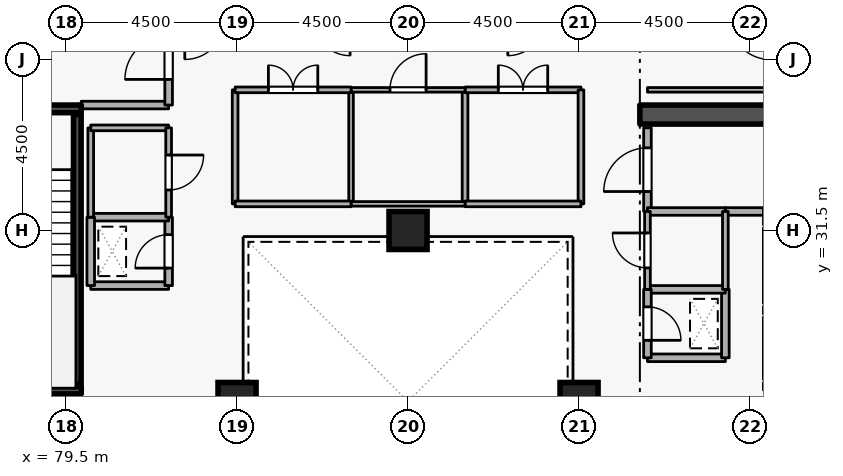
"""IFC4 building model, lengths in metres.
Left out: names, types, materials, properties, quantities, classifications, styles, units other than length and angle.
Written with IfcOpenShell. Run it as: python <this file> out.ifc"""

import sys

from ifc_helpers import new_model, si_unit, direction, frame, frame_2d, origin, origin_2d, place, context, subcontext, project, spatial, rectangle, extrude, element, fill, save


model = new_model("IFC4")
c1 = context("Model", 3, precision=1e-05, world=origin(), true_north=direction((0.0, 1.0)))
c2 = subcontext(c1, "Body", "Model", "MODEL_VIEW")
j1 = project(units=[si_unit("LENGTHUNIT", "METRE"), si_unit("PLANEANGLEUNIT", "RADIAN")], contexts=[c1])
p1 = place(None, origin())
s1 = spatial("IfcSite", under=j1, at=p1, CompositionType="ELEMENT")
p2 = place(p1, origin())
s2 = spatial("IfcBuilding", under=s1, at=p2, CompositionType="ELEMENT")
p3 = place(p2, frame((0.0, 0.0, 218.1)))
s3 = spatial("IfcBuildingStorey", under=s2, at=p3, CompositionType="ELEMENT", Elevation=218.1)
p4 = place(p3, frame((94.6, 34.55, 0.0), z_axis=(0.0, 0.0, 1.0), x_axis=(1.0, 0.0, 0.0)))
e1 = element("IfcWall", 1, at=p4, inside=s3, PredefinedType="SHEAR", context=c2, shape_type="SweptSolid", body=[
    extrude(rectangle(XDim=5.8, YDim=0.5, at=frame_2d((2.9, 0.0))), origin(), (0.0, 0.0, 1.0), 3.6),
])
for number, where, z_axis, x_axis in (
    (2, (93.0, 27.0, 0.0), (0.0, 0.0, 1.0), (1.0, 0.0, 0.0)),
    (3, (84.0, 27.0, 0.0), (0.0, 0.0, 1.0), (1.0, 0.0, 0.0)),
    (4, (88.5, 31.5, 0.0), (0.0, 0.0, 1.0), (1.0, 0.0, 0.0)),
):
    element("IfcColumn", number, at=place(p3, frame(where, z_axis=z_axis, x_axis=x_axis)), inside=s3, PredefinedType="COLUMN", context=c2, shape_type="SweptSolid", body=[
        extrude(rectangle(XDim=1.0, YDim=1.0, at=origin_2d()), origin(), (0.0, 0.0, 1.0), 3.6),
    ])
p5 = place(p3, frame((97.95, 29.22, 0.0), z_axis=(0.0, 0.0, 1.0), x_axis=(0.0, -1.0, 0.0)))
e5 = element("IfcWall", 5, at=p5, inside=s3, PredefinedType="STANDARD", context=c2, shape_type="SweptSolid", body=[
    extrude(rectangle(XDim=1.64, YDim=0.2, at=frame_2d((0.82, 0.0))), origin(), (0.0, 0.0, 1.0), 3.26),
])
p6 = place(p5, frame((0.31, 0.0, 0.0)))
e6 = element("IfcOpeningElement", 6, at=p6, cuts=e5, PredefinedType="OPENING", context=c2, shape_type="SweptSolid", body=[
    extrude(rectangle(XDim=1.02, YDim=2.06, at=frame_2d((0.51, 1.03))), frame((0.0, 0.11, 0.0), z_axis=(0.0, -1.0, 0.0), x_axis=(1.0, 0.0, 0.0)), (0.0, 0.0, 1.0), 0.22),
])
p7 = place(p3, frame((97.95, 31.57, 0.0), z_axis=(0.0, 0.0, 1.0), x_axis=(0.0, -1.0, 0.0)))
e7 = element("IfcWall", 7, at=p7, inside=s3, PredefinedType="STANDARD", context=c2, shape_type="SweptSolid", body=[
    extrude(rectangle(XDim=1.99, YDim=0.2, at=frame_2d((0.995, 0.0))), origin(), (0.0, 0.0, 1.0), 3.26),
])
p8 = place(p7, frame((0.485, 0.0, 0.0)))
e8 = element("IfcOpeningElement", 8, at=p8, cuts=e7, PredefinedType="OPENING", context=c2, shape_type="SweptSolid", body=[
    extrude(rectangle(XDim=1.02, YDim=2.06, at=frame_2d((0.51, 1.03))), frame((0.0, 0.11, 0.0), z_axis=(0.0, -1.0, 0.0), x_axis=(1.0, 0.0, 0.0)), (0.0, 0.0, 1.0), 0.22),
])
p9 = place(p3, frame((76.55, 34.7, 0.0), z_axis=(0.0, 0.0, 1.0), x_axis=(1.0, 0.0, 0.0)))
e9 = element("IfcWall", 9, at=p9, inside=s3, PredefinedType="SHEAR", context=c2, shape_type="SweptSolid", body=[
    extrude(rectangle(XDim=3.35, YDim=0.2, at=frame_2d((1.675, 0.0))), origin(), (0.0, 0.0, 1.0), 3.6),
])
p10 = place(p9, frame((1.125, 0.0, 0.0)))
e10 = element("IfcOpeningElement", 10, at=p10, cuts=e9, PredefinedType="OPENING", context=c2, shape_type="SweptSolid", body=[
    extrude(rectangle(XDim=1.1, YDim=2.1, at=frame_2d((0.55, 1.05))), frame((0.0, 0.11, 0.0), z_axis=(0.0, -1.0, 0.0), x_axis=(1.0, 0.0, 0.0)), (0.0, 0.0, 1.0), 0.22),
])
p11 = place(p3, frame((79.9, 27.3, 0.0), z_axis=(0.0, 0.0, 1.0), x_axis=(-1.0, 0.0, 0.0)))
e11 = element("IfcWall", 11, at=p11, inside=s3, PredefinedType="SHEAR", context=c2, shape_type="SweptSolid", body=[
    extrude(rectangle(XDim=3.35, YDim=0.2, at=frame_2d((1.675, 0.0))), origin(), (0.0, 0.0, 1.0), 3.6),
])
p12 = place(p3, frame((79.797, 27.45, 0.0), z_axis=(0.0, 0.0, 1.0), x_axis=(0.0, 1.0, 0.0)))
e12 = element("IfcWall", 12, at=p12, inside=s3, PredefinedType="SHEAR", context=c2, shape_type="SweptSolid", body=[
    extrude(rectangle(XDim=7.1, YDim=0.2, at=frame_2d((3.55, 0.0))), origin(), (0.0, 0.0, 1.0), 3.6),
])
p13 = place(p3, frame((79.9, 34.8, 0.0), z_axis=(0.0, 0.0, 1.0), x_axis=(1.0, 0.0, 0.0)))
e13 = element("IfcWall", 13, at=p13, inside=s3, PredefinedType="STANDARD", context=c2, shape_type="SweptSolid", body=[
    extrude(rectangle(XDim=2.3, YDim=0.2, at=frame_2d((1.15, 0.0))), origin(), (0.0, 0.0, 1.0), 2.465),
])
p14 = place(p3, frame((82.2, 34.8, 0.0), z_axis=(0.0, 0.0, 1.0), x_axis=(0.0, 1.0, 0.0)))
e14 = element("IfcWall", 14, at=p14, inside=s3, PredefinedType="STANDARD", context=c2, shape_type="SweptSolid", body=[
    extrude(rectangle(XDim=2.5, YDim=0.2, at=frame_2d((1.25, 0.0))), origin(), (0.0, 0.0, 1.0), 3.26),
])
p15 = place(p14, frame((0.675, 0.0, 0.0)))
e15 = element("IfcOpeningElement", 15, at=p15, cuts=e14, PredefinedType="OPENING", context=c2, shape_type="SweptSolid", body=[
    extrude(rectangle(XDim=1.15, YDim=2.1, at=frame_2d((0.575, 1.05))), frame((0.0, 0.11, 0.0), z_axis=(0.0, -1.0, 0.0), x_axis=(1.0, 0.0, 0.0)), (0.0, 0.0, 1.0), 0.22),
])
p16 = place(p3, frame((94.8, 28.15, 0.0), z_axis=(0.0, 0.0, 1.0), x_axis=(1.0, 0.0, 0.0)))
e16 = element("IfcWall", 16, at=p16, inside=s3, PredefinedType="STANDARD", context=c2, shape_type="SweptSolid", body=[
    extrude(rectangle(XDim=2.05, YDim=0.2, at=frame_2d((1.025, 0.0))), origin(), (0.0, 0.0, 1.0), 3.26),
])
p17 = place(p3, frame((96.85, 28.15, 0.0), z_axis=(0.0, 0.0, 1.0), x_axis=(0.0, 1.0, 0.0)))
e17 = element("IfcWall", 17, at=p17, inside=s3, PredefinedType="STANDARD", context=c2, shape_type="SweptSolid", body=[
    extrude(rectangle(XDim=1.8, YDim=0.2, at=frame_2d((0.9, 0.0))), origin(), (0.0, 0.0, 1.0), 3.26),
])
p18 = place(p3, frame((96.85, 29.95, 0.0), z_axis=(0.0, 0.0, 1.0), x_axis=(-1.0, 0.0, 0.0)))
e18 = element("IfcWall", 18, at=p18, inside=s3, PredefinedType="STANDARD", context=c2, shape_type="SweptSolid", body=[
    extrude(rectangle(XDim=2.05, YDim=0.2, at=frame_2d((1.025, 0.0))), origin(), (0.0, 0.0, 1.0), 3.26),
])
p19 = place(p3, frame((94.8, 29.95, 0.0), z_axis=(0.0, 0.0, 1.0), x_axis=(0.0, -1.0, 0.0)))
e19 = element("IfcWall", 19, at=p19, inside=s3, PredefinedType="STANDARD", context=c2, shape_type="SweptSolid", body=[
    extrude(rectangle(XDim=1.8, YDim=0.2, at=frame_2d((0.9, 0.0))), origin(), (0.0, 0.0, 1.0), 3.26),
])
p20 = place(p19, frame((0.46, 0.0, 0.0)))
e20 = element("IfcOpeningElement", 20, at=p20, cuts=e19, PredefinedType="OPENING", context=c2, shape_type="SweptSolid", body=[
    extrude(rectangle(XDim=0.88, YDim=2.04, at=frame_2d((0.44, 1.02))), frame((0.0, 0.11, 0.0), z_axis=(0.0, -1.0, 0.0), x_axis=(1.0, 0.0, 0.0)), (0.0, 0.0, 1.0), 0.22),
])
p21 = place(p3, frame((80.15, 30.05, 0.0), z_axis=(0.0, 0.0, 1.0), x_axis=(1.0, 0.0, 0.0)))
e21 = element("IfcWall", 21, at=p21, inside=s3, PredefinedType="STANDARD", context=c2, shape_type="SweptSolid", body=[
    extrude(rectangle(XDim=2.05, YDim=0.2, at=frame_2d((1.025, 0.0))), origin(), (0.0, 0.0, 1.0), 3.26),
])
p22 = place(p3, frame((82.2, 30.05, 0.0), z_axis=(0.0, 0.0, 1.0), x_axis=(0.0, 1.0, 0.0)))
e22 = element("IfcWall", 22, at=p22, inside=s3, PredefinedType="STANDARD", context=c2, shape_type="SweptSolid", body=[
    extrude(rectangle(XDim=1.8, YDim=0.2, at=frame_2d((0.9, 0.0))), origin(), (0.0, 0.0, 1.0), 3.26),
])
p23 = place(p22, frame((0.46, 0.0, 0.0)))
e23 = element("IfcOpeningElement", 23, at=p23, cuts=e22, PredefinedType="OPENING", context=c2, shape_type="SweptSolid", body=[
    extrude(rectangle(XDim=0.88, YDim=2.04, at=frame_2d((0.44, 1.02))), frame((0.0, 0.11, 0.0), z_axis=(0.0, -1.0, 0.0), x_axis=(1.0, 0.0, 0.0)), (0.0, 0.0, 1.0), 0.22),
])
p24 = place(p3, frame((82.2, 31.85, 0.0), z_axis=(0.0, 0.0, 1.0), x_axis=(-1.0, 0.0, 0.0)))
e24 = element("IfcWall", 24, at=p24, inside=s3, PredefinedType="STANDARD", context=c2, shape_type="SweptSolid", body=[
    extrude(rectangle(XDim=2.05, YDim=0.2, at=frame_2d((1.025, 0.0))), origin(), (0.0, 0.0, 1.0), 3.26),
])
p25 = place(p3, frame((80.15, 31.85, 0.0), z_axis=(0.0, 0.0, 1.0), x_axis=(0.0, -1.0, 0.0)))
e25 = element("IfcWall", 25, at=p25, inside=s3, PredefinedType="STANDARD", context=c2, shape_type="SweptSolid", body=[
    extrude(rectangle(XDim=1.8, YDim=0.2, at=frame_2d((0.9, 0.0))), origin(), (0.0, 0.0, 1.0), 3.26),
])
p26 = place(p3, frame((94.8, 32.0, 0.0), z_axis=(0.0, 0.0, 1.0), x_axis=(0.0, 1.0, 0.0)))
e26 = element("IfcWall", 26, at=p26, inside=s3, PredefinedType="STANDARD", context=c2, shape_type="SweptSolid", body=[
    extrude(rectangle(XDim=2.2, YDim=0.2, at=frame_2d((1.1, 0.0))), origin(), (0.0, 0.0, 1.0), 3.26),
])
p27 = place(p26, frame((0.525, 0.0, 0.0)))
e27 = element("IfcOpeningElement", 27, at=p27, cuts=e26, PredefinedType="OPENING", context=c2, shape_type="SweptSolid", body=[
    extrude(rectangle(XDim=1.15, YDim=2.1, at=frame_2d((0.575, 1.05))), frame((0.0, 0.11, 0.0), z_axis=(0.0, -1.0, 0.0), x_axis=(1.0, 0.0, 0.0)), (0.0, 0.0, 1.0), 0.22),
])
p28 = place(p3, frame((97.852, 32.0, 0.0), z_axis=(0.0, 0.0, 1.0), x_axis=(-1.0, 0.0, 0.0)))
e28 = element("IfcWall", 28, at=p28, inside=s3, PredefinedType="STANDARD", context=c2, shape_type="SweptSolid", body=[
    extrude(rectangle(XDim=1.002, YDim=0.2, at=frame_2d((0.501, 0.0))), origin(), (0.0, 0.0, 1.0), 3.26),
])
p29 = place(p3, frame((96.85, 32.0, 0.0), z_axis=(0.0, 0.0, 1.0), x_axis=(-1.0, 0.0, 0.0)))
e29 = element("IfcWall", 29, at=p29, inside=s3, PredefinedType="STANDARD", context=c2, shape_type="SweptSolid", body=[
    extrude(rectangle(XDim=2.05, YDim=0.2, at=frame_2d((1.025, 0.0))), origin(), (0.0, 0.0, 1.0), 3.26),
])
p30 = place(p3, frame((94.8, 29.95, 0.0), z_axis=(0.0, 0.0, 1.0), x_axis=(0.0, 1.0, 0.0)))
e30 = element("IfcWall", 30, at=p30, inside=s3, PredefinedType="PARTITIONING", context=c2, shape_type="SweptSolid", body=[
    extrude(rectangle(XDim=2.05, YDim=0.15, at=frame_2d((1.025, 0.0))), origin(), (0.0, 0.0, 1.0), 3.26),
])
p31 = place(p30, frame((0.565, 0.0, 0.0)))
e31 = element("IfcOpeningElement", 31, at=p31, cuts=e30, PredefinedType="OPENING", context=c2, shape_type="SweptSolid", body=[
    extrude(rectangle(XDim=0.92, YDim=2.08, at=frame_2d((0.46, 1.04))), frame((0.0, 0.085, 0.0), z_axis=(0.0, -1.0, 0.0), x_axis=(1.0, 0.0, 0.0)), (0.0, 0.0, 1.0), 0.17),
])
p32 = place(p3, frame((96.85, 32.0, 0.0), z_axis=(0.0, 0.0, 1.0), x_axis=(0.0, -1.0, 0.0)))
e32 = element("IfcWall", 32, at=p32, inside=s3, PredefinedType="PARTITIONING", context=c2, shape_type="SweptSolid", body=[
    extrude(rectangle(XDim=2.05, YDim=0.15, at=frame_2d((1.025, 0.0))), origin(), (0.0, 0.0, 1.0), 3.26),
])
p33 = place(p3, frame((80.15, 31.85, 0.0), z_axis=(0.0, 0.0, 1.0), x_axis=(0.0, 1.0, 0.0)))
e33 = element("IfcWall", 33, at=p33, inside=s3, PredefinedType="PARTITIONING", context=c2, shape_type="SweptSolid", body=[
    extrude(rectangle(XDim=2.35, YDim=0.15, at=frame_2d((1.175, 0.0))), origin(), (0.0, 0.0, 1.0), 3.26),
])
p34 = place(p3, frame((80.15, 34.2, 0.0), z_axis=(0.0, 0.0, 1.0), x_axis=(1.0, 0.0, 0.0)))
e34 = element("IfcWall", 34, at=p34, inside=s3, PredefinedType="PARTITIONING", context=c2, shape_type="SweptSolid", body=[
    extrude(rectangle(XDim=2.05, YDim=0.15, at=frame_2d((1.025, 0.0))), origin(), (0.0, 0.0, 1.0), 2.465),
])
p35 = place(p3, frame((82.2, 34.2, 0.0), z_axis=(0.0, 0.0, 1.0), x_axis=(0.0, -1.0, 0.0)))
e35 = element("IfcWall", 35, at=p35, inside=s3, PredefinedType="PARTITIONING", context=c2, shape_type="SweptSolid", body=[
    extrude(rectangle(XDim=2.35, YDim=0.15, at=frame_2d((1.175, 0.0))), origin(), (0.0, 0.0, 1.0), 3.26),
])
p36 = place(p35, frame((0.715, 0.0, 0.0)))
e36 = element("IfcOpeningElement", 36, at=p36, cuts=e35, PredefinedType="OPENING", context=c2, shape_type="SweptSolid", body=[
    extrude(rectangle(XDim=0.92, YDim=2.08, at=frame_2d((0.46, 1.04))), frame((0.0, 0.085, 0.0), z_axis=(0.0, -1.0, 0.0), x_axis=(1.0, 0.0, 0.0)), (0.0, 0.0, 1.0), 0.17),
])
p37 = place(p3, frame((94.8, 35.2, 0.0), z_axis=(0.0, 0.0, 1.0), x_axis=(1.0, 0.0, 0.0)))
e37 = element("IfcWall", 37, at=p37, inside=s3, PredefinedType="PARTITIONING", context=c2, shape_type="SweptSolid", body=[
    extrude(rectangle(XDim=5.9, YDim=0.12, at=frame_2d((2.95, 0.0))), origin(), (0.0, 0.0, 1.0), 3.26),
])
p38 = place(p3, frame((90.0, 32.2, 0.0), z_axis=(0.0, 0.0, 1.0), x_axis=(0.0, 1.0, 0.0)))
e38 = element("IfcWall", 38, at=p38, inside=s3, PredefinedType="PARTITIONING", context=c2, shape_type="SweptSolid", body=[
    extrude(rectangle(XDim=3.0, YDim=0.15, at=frame_2d((1.5, 0.0))), origin(), (0.0, 0.0, 1.0), 3.26),
])
p39 = place(p3, frame((90.0, 35.2, 0.0), z_axis=(0.0, 0.0, 1.0), x_axis=(1.0, 0.0, 0.0)))
e39 = element("IfcWall", 39, at=p39, inside=s3, PredefinedType="PARTITIONING", context=c2, shape_type="SweptSolid", body=[
    extrude(rectangle(XDim=3.05, YDim=0.15, at=frame_2d((1.525, 0.0))), origin(), (0.0, 0.0, 1.0), 3.26),
])
p40 = place(p39, frame((0.875, 0.0, 0.0)))
e40 = element("IfcOpeningElement", 40, at=p40, cuts=e39, PredefinedType="OPENING", context=c2, shape_type="SweptSolid", body=[
    extrude(rectangle(XDim=1.3, YDim=2.12, at=frame_2d((0.65, 1.06))), frame((0.0, 0.085, 0.0), z_axis=(0.0, -1.0, 0.0), x_axis=(1.0, 0.0, 0.0)), (0.0, 0.0, 1.0), 0.17),
])
p41 = place(p3, frame((93.05, 35.2, 0.0), z_axis=(0.0, 0.0, 1.0), x_axis=(0.0, -1.0, 0.0)))
e41 = element("IfcWall", 41, at=p41, inside=s3, PredefinedType="PARTITIONING", context=c2, shape_type="SweptSolid", body=[
    extrude(rectangle(XDim=3.0, YDim=0.15, at=frame_2d((1.5, 0.0))), origin(), (0.0, 0.0, 1.0), 3.26),
])
p42 = place(p3, frame((93.05, 32.2, 0.0), z_axis=(0.0, 0.0, 1.0), x_axis=(-1.0, 0.0, 0.0)))
e42 = element("IfcWall", 42, at=p42, inside=s3, PredefinedType="PARTITIONING", context=c2, shape_type="SweptSolid", body=[
    extrude(rectangle(XDim=3.05, YDim=0.15, at=frame_2d((1.525, 0.0))), origin(), (0.0, 0.0, 1.0), 3.26),
])
p43 = place(p3, frame((87.0, 32.2, 0.0), z_axis=(0.0, 0.0, 1.0), x_axis=(0.0, 1.0, 0.0)))
e43 = element("IfcWall", 43, at=p43, inside=s3, PredefinedType="PARTITIONING", context=c2, shape_type="SweptSolid", body=[
    extrude(rectangle(XDim=3.0, YDim=0.12, at=frame_2d((1.5, 0.0))), origin(), (0.0, 0.0, 1.0), 3.26),
])
p44 = place(p3, frame((87.0, 35.2, 0.0), z_axis=(0.0, 0.0, 1.0), x_axis=(1.0, 0.0, 0.0)))
e44 = element("IfcWall", 44, at=p44, inside=s3, PredefinedType="PARTITIONING", context=c2, shape_type="SweptSolid", body=[
    extrude(rectangle(XDim=3.0, YDim=0.12, at=frame_2d((1.5, 0.0))), origin(), (0.0, 0.0, 1.0), 3.26),
])
p45 = place(p44, frame((1.025, 0.0, 0.0)))
e45 = element("IfcOpeningElement", 45, at=p45, cuts=e44, PredefinedType="OPENING", context=c2, shape_type="SweptSolid", body=[
    extrude(rectangle(XDim=0.95, YDim=2.1, at=frame_2d((0.475, 1.05))), frame((0.0, 0.07, 0.0), z_axis=(0.0, -1.0, 0.0), x_axis=(1.0, 0.0, 0.0)), (0.0, 0.0, 1.0), 0.14),
])
p46 = place(p3, frame((90.0, 32.2, 0.0), z_axis=(0.0, 0.0, 1.0), x_axis=(-1.0, 0.0, 0.0)))
e46 = element("IfcWall", 46, at=p46, inside=s3, PredefinedType="PARTITIONING", context=c2, shape_type="SweptSolid", body=[
    extrude(rectangle(XDim=3.0, YDim=0.12, at=frame_2d((1.5, 0.0))), origin(), (0.0, 0.0, 1.0), 3.26),
])
p47 = place(p3, frame((83.95, 32.2, 0.0), z_axis=(0.0, 0.0, 1.0), x_axis=(0.0, 1.0, 0.0)))
e47 = element("IfcWall", 47, at=p47, inside=s3, PredefinedType="PARTITIONING", context=c2, shape_type="SweptSolid", body=[
    extrude(rectangle(XDim=3.0, YDim=0.15, at=frame_2d((1.5, 0.0))), origin(), (0.0, 0.0, 1.0), 3.26),
])
p48 = place(p3, frame((83.95, 35.2, 0.0), z_axis=(0.0, 0.0, 1.0), x_axis=(1.0, 0.0, 0.0)))
e48 = element("IfcWall", 48, at=p48, inside=s3, PredefinedType="PARTITIONING", context=c2, shape_type="SweptSolid", body=[
    extrude(rectangle(XDim=3.05, YDim=0.15, at=frame_2d((1.525, 0.0))), origin(), (0.0, 0.0, 1.0), 3.26),
])
p49 = place(p48, frame((0.875, 0.0, 0.0)))
e49 = element("IfcOpeningElement", 49, at=p49, cuts=e48, PredefinedType="OPENING", context=c2, shape_type="SweptSolid", body=[
    extrude(rectangle(XDim=1.3, YDim=2.12, at=frame_2d((0.65, 1.06))), frame((0.0, 0.085, 0.0), z_axis=(0.0, -1.0, 0.0), x_axis=(1.0, 0.0, 0.0)), (0.0, 0.0, 1.0), 0.17),
])
p50 = place(p3, frame((87.0, 32.2, 0.0), z_axis=(0.0, 0.0, 1.0), x_axis=(-1.0, 0.0, 0.0)))
e50 = element("IfcWall", 50, at=p50, inside=s3, PredefinedType="PARTITIONING", context=c2, shape_type="SweptSolid", body=[
    extrude(rectangle(XDim=3.05, YDim=0.15, at=frame_2d((1.525, 0.0))), origin(), (0.0, 0.0, 1.0), 3.26),
])
p51 = place(p15, origin())
e51 = element("IfcDoor", 51, at=p51, inside=s3, OperationType="SINGLE_SWING_LEFT", PredefinedType="DOOR", context=c2, shape_type="SweptSolid", body=[
    extrude(rectangle(XDim=1.15, YDim=2.1, at=frame_2d((0.575, 1.05))), frame((0.0, 0.025, 0.0), z_axis=(0.0, -1.0, 0.0), x_axis=(1.0, 0.0, 0.0)), (0.0, 0.0, 1.0), 0.05),
])
fill(e15, e51)
p52 = place(p20, origin())
e52 = element("IfcDoor", 52, at=p52, inside=s3, OperationType="SINGLE_SWING_RIGHT", PredefinedType="DOOR", context=c2, shape_type="SweptSolid", body=[
    extrude(rectangle(XDim=0.88, YDim=2.04, at=frame_2d((0.44, 1.02))), frame((0.0, 0.025, 0.0), z_axis=(0.0, -1.0, 0.0), x_axis=(1.0, 0.0, 0.0)), (0.0, 0.0, 1.0), 0.05),
])
fill(e20, e52)
p53 = place(p23, origin())
e53 = element("IfcDoor", 53, at=p53, inside=s3, OperationType="SINGLE_SWING_LEFT", PredefinedType="DOOR", context=c2, shape_type="SweptSolid", body=[
    extrude(rectangle(XDim=0.88, YDim=2.04, at=frame_2d((0.44, 1.02))), frame((0.0, 0.025, 0.0), z_axis=(0.0, -1.0, 0.0), x_axis=(1.0, 0.0, 0.0)), (0.0, 0.0, 1.0), 0.05),
])
fill(e23, e53)
p54 = place(p31, origin())
e54 = element("IfcDoor", 54, at=p54, inside=s3, OperationType="SINGLE_SWING_RIGHT", PredefinedType="DOOR", context=c2, shape_type="SweptSolid", body=[
    extrude(rectangle(XDim=0.92, YDim=2.08, at=frame_2d((0.46, 1.04))), frame((0.0, 0.025, 0.0), z_axis=(0.0, -1.0, 0.0), x_axis=(1.0, 0.0, 0.0)), (0.0, 0.0, 1.0), 0.05),
])
fill(e31, e54)
p55 = place(p27, origin())
e55 = element("IfcDoor", 55, at=p55, inside=s3, OperationType="SINGLE_SWING_LEFT", PredefinedType="DOOR", context=c2, shape_type="SweptSolid", body=[
    extrude(rectangle(XDim=1.15, YDim=2.1, at=frame_2d((0.575, 1.05))), frame((0.0, 0.025, 0.0), z_axis=(0.0, -1.0, 0.0), x_axis=(1.0, 0.0, 0.0)), (0.0, 0.0, 1.0), 0.05),
])
fill(e27, e55)
p56 = place(p36, origin())
e56 = element("IfcDoor", 56, at=p56, inside=s3, OperationType="SINGLE_SWING_LEFT", PredefinedType="DOOR", context=c2, shape_type="SweptSolid", body=[
    extrude(rectangle(XDim=0.92, YDim=2.08, at=frame_2d((0.46, 1.04))), frame((0.0, 0.025, 0.0), z_axis=(0.0, -1.0, 0.0), x_axis=(1.0, 0.0, 0.0)), (0.0, 0.0, 1.0), 0.05),
])
fill(e36, e56)
p57 = place(p40, origin())
e57 = element("IfcDoor", 57, at=p57, inside=s3, OperationType="DOUBLE_DOOR_SINGLE_SWING", PredefinedType="DOOR", context=c2, shape_type="SweptSolid", body=[
    extrude(rectangle(XDim=1.3, YDim=2.12, at=frame_2d((0.65, 1.06))), frame((0.0, 0.025, 0.0), z_axis=(0.0, -1.0, 0.0), x_axis=(1.0, 0.0, 0.0)), (0.0, 0.0, 1.0), 0.05),
])
fill(e40, e57)
p58 = place(p45, origin())
e58 = element("IfcDoor", 58, at=p58, inside=s3, OperationType="SINGLE_SWING_RIGHT", PredefinedType="DOOR", context=c2, shape_type="SweptSolid", body=[
    extrude(rectangle(XDim=0.95, YDim=2.1, at=frame_2d((0.475, 1.05))), frame((0.0, 0.025, 0.0), z_axis=(0.0, -1.0, 0.0), x_axis=(1.0, 0.0, 0.0)), (0.0, 0.0, 1.0), 0.05),
])
fill(e45, e58)
p59 = place(p49, origin())
e59 = element("IfcDoor", 59, at=p59, inside=s3, OperationType="DOUBLE_DOOR_SINGLE_SWING", PredefinedType="DOOR", context=c2, shape_type="SweptSolid", body=[
    extrude(rectangle(XDim=1.3, YDim=2.12, at=frame_2d((0.65, 1.06))), frame((0.0, 0.025, 0.0), z_axis=(0.0, -1.0, 0.0), x_axis=(1.0, 0.0, 0.0)), (0.0, 0.0, 1.0), 0.05),
])
fill(e49, e59)
save(model, sys.argv[1])
